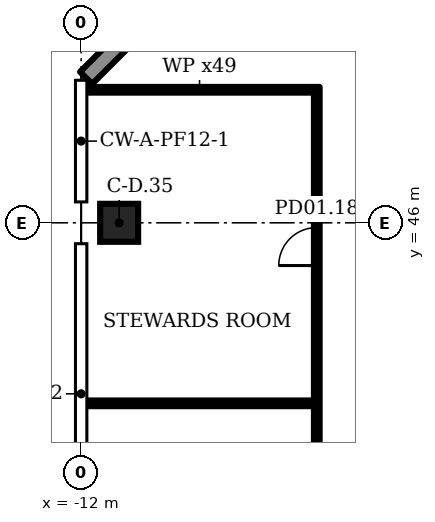
"""IFC4 building model, lengths in metres.
Left out: names, types, materials, properties, quantities, classifications, styles, units other than length and angle.
Written with IfcOpenShell. Run it as: python <this file> out.ifc"""

import sys

from ifc_helpers import new_model, si_unit, direction, frame, frame_2d, origin, origin_2d, place, context, subcontext, project, spatial, rectangle, extrude, element, fill, save


model = new_model("IFC4")
c1 = context("Model", 3, precision=1e-05, world=origin(), true_north=direction((0.0, 1.0)))
c2 = subcontext(c1, "Body", "Model", "MODEL_VIEW")
j1 = project(units=[si_unit("LENGTHUNIT", "METRE"), si_unit("PLANEANGLEUNIT", "RADIAN")], contexts=[c1])
p1 = place(None, origin())
s1 = spatial("IfcSite", under=j1, at=p1, CompositionType="ELEMENT")
p2 = place(p1, origin())
s2 = spatial("IfcBuilding", under=s1, at=p2, CompositionType="ELEMENT")
p3 = place(p2, frame((0.0, 0.0, 8.0)))
s3 = spatial("IfcBuildingStorey", under=s2, at=p3, CompositionType="ELEMENT", Elevation=8.0)
p4 = place(p3, frame((-11.0, 46.0, 0.0), z_axis=(0.0, 0.0, 1.0), x_axis=(1.0, 0.0, 0.0)))
e1 = element("IfcColumn", 1, at=p4, inside=s3, PredefinedType="COLUMN", context=c2, shape_type="SweptSolid", body=[
    extrude(rectangle(XDim=1.0, YDim=1.0, at=origin_2d()), origin(), (0.0, 0.0, 1.0), 7.0),
])
p5 = place(p3, frame((-5.912, 55.77, 0.0), z_axis=(0.0, 0.0, 1.0), x_axis=(-0.707092, -0.707121, 0.0)))
e2 = element("IfcWall", 2, at=p5, inside=s3, PredefinedType="SOLIDWALL", context=c2, shape_type="SweptSolid", body=[
    extrude(rectangle(XDim=8.425, YDim=0.45, at=frame_2d((4.213, 0.0))), origin(), (0.0, 0.0, 1.0), 6.7),
])
p6 = place(p3, frame((-5.8, 32.925, 0.0), z_axis=(0.0, 0.0, 1.0), x_axis=(0.0, 1.0, 0.0)))
e3 = element("IfcWall", 3, at=p6, inside=s3, PredefinedType="PARTITIONING", context=c2, shape_type="SweptSolid", body=[
    extrude(rectangle(XDim=16.65, YDim=0.15, at=frame_2d((8.325, 0.0))), origin(), (0.0, 0.0, 1.0), 6.7),
])
p7 = place(p6, frame((3.7, 0.0, 0.0)))
e4 = element("IfcOpeningElement", 4, at=p7, cuts=e3, PredefinedType="OPENING", context=c2, shape_type="SweptSolid", body=[
    extrude(rectangle(XDim=1.0, YDim=2.1, at=frame_2d((0.5, 1.05))), frame((0.0, 0.085, 0.0), z_axis=(0.0, -1.0, 0.0), x_axis=(1.0, 0.0, 0.0)), (0.0, 0.0, 1.0), 0.17),
])
p8 = place(p6, frame((11.95, 0.0, 0.0)))
e5 = element("IfcOpeningElement", 5, at=p8, cuts=e3, PredefinedType="OPENING", context=c2, shape_type="SweptSolid", body=[
    extrude(rectangle(XDim=1.0, YDim=2.1, at=frame_2d((0.5, 1.05))), frame((0.0, 0.085, 0.0), z_axis=(0.0, -1.0, 0.0), x_axis=(1.0, 0.0, 0.0)), (0.0, 0.0, 1.0), 0.17),
])
for number, where, z_axis, x_axis in (
    (6, (-11.895, 41.25, 0.0), (0.0, 0.0, 1.0), (1.0, 0.0, 0.0)),
    (7, (-11.895, 49.5, 0.0), (0.0, 0.0, 1.0), (1.0, 0.0, 0.0)),
):
    element("IfcWall", number, at=place(p3, frame(where, z_axis=z_axis, x_axis=x_axis)), inside=s3, PredefinedType="PARTITIONING", context=c2, shape_type="SweptSolid", body=[
        extrude(rectangle(XDim=6.02, YDim=0.15, at=frame_2d((3.01, 0.0))), origin(), (0.0, 0.0, 1.0), 6.7),
    ])
p9 = place(p8, origin())
e8 = element("IfcDoor", 8, at=p9, inside=s3, OperationType="SINGLE_SWING_LEFT", PredefinedType="DOOR", context=c2, shape_type="SweptSolid", body=[
    extrude(rectangle(XDim=1.0, YDim=2.1, at=frame_2d((0.5, 1.05))), frame((0.0, 0.025, 0.0), z_axis=(0.0, -1.0, 0.0), x_axis=(1.0, 0.0, 0.0)), (0.0, 0.0, 1.0), 0.05),
])
fill(e5, e8)
save(model, sys.argv[1])
